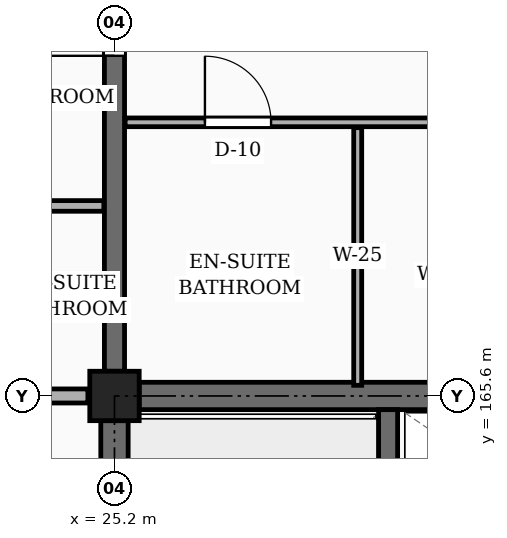
"""IFC4 building model, lengths in metres.
Left out: names, types, materials, properties, quantities, classifications, styles, units other than length and angle.
Written with IfcOpenShell. Run it as: python <this file> out.ifc"""

import sys

from ifc_helpers import new_model, si_unit, direction, frame, frame_2d, origin, origin_2d, place, context, subcontext, project, spatial, rectangle, extrude, element, fill, save


model = new_model("IFC4")
c1 = context("Model", 3, precision=1e-05, world=origin(), true_north=direction((0.0, 1.0)))
c2 = subcontext(c1, "Body", "Model", "MODEL_VIEW")
j1 = project(units=[si_unit("LENGTHUNIT", "METRE"), si_unit("PLANEANGLEUNIT", "RADIAN")], contexts=[c1])
p1 = place(None, origin())
s1 = spatial("IfcSite", under=j1, at=p1, CompositionType="ELEMENT")
p2 = place(p1, origin())
s2 = spatial("IfcBuilding", under=s1, at=p2, CompositionType="ELEMENT")
p3 = place(p2, origin())
s3 = spatial("IfcBuildingStorey", under=s2, at=p3, CompositionType="ELEMENT", Elevation=0.0)
p4 = place(p3, frame((25.2, 165.6, 0.0), z_axis=(0.0, 0.0, 1.0), x_axis=(1.0, 0.0, 0.0)))
e1 = element("IfcColumn", 1, at=p4, inside=s3, PredefinedType="COLUMN", context=c2, shape_type="SweptSolid", body=[
    extrude(rectangle(XDim=0.65, YDim=0.65, at=origin_2d()), origin(), (0.0, 0.0, 1.0), 4.5),
])
p5 = place(p3, frame((25.2, 165.925, 0.0), z_axis=(0.0, 0.0, 1.0), x_axis=(0.0, 1.0, 0.0)))
e2 = element("IfcWall", 2, at=p5, inside=s3, PredefinedType="SOLIDWALL", context=c2, shape_type="SweptSolid", body=[
    extrude(rectangle(XDim=6.615, YDim=0.265, at=frame_2d((3.308, 0.0))), origin(), (0.0, 0.0, 1.0), 3.535),
])
p6 = place(p5, frame((4.15, 0.0, 0.0)))
e3 = element("IfcOpeningElement", 3, at=p6, cuts=e2, PredefinedType="OPENING", context=c2, shape_type="SweptSolid", body=[
    extrude(rectangle(XDim=0.98, YDim=2.12, at=frame_2d((0.49, 1.06))), frame((0.0, 0.143, 0.0), z_axis=(0.0, -1.0, 0.0), x_axis=(1.0, 0.0, 0.0)), (0.0, 0.0, 1.0), 0.285),
])
p7 = place(p3, frame((25.2, 158.725, 0.0), z_axis=(0.0, 0.0, 1.0), x_axis=(0.0, 1.0, 0.0)))
e4 = element("IfcWall", 4, at=p7, inside=s3, PredefinedType="SHEAR", context=c2, shape_type="SweptSolid", body=[
    extrude(rectangle(XDim=6.55, YDim=0.36, at=frame_2d((3.275, 0.0))), origin(), (0.0, 0.0, 1.0), 4.235),
])
p8 = place(p3, frame((25.525, 165.6, 0.0), z_axis=(0.0, 0.0, 1.0), x_axis=(1.0, 0.0, 0.0)))
e5 = element("IfcWall", 5, at=p8, inside=s3, PredefinedType="SHEAR", context=c2, shape_type="SweptSolid", body=[
    extrude(rectangle(XDim=6.55, YDim=0.36, at=frame_2d((3.275, 0.0))), origin(), (0.0, 0.0, 1.0), 4.235),
])
p9 = place(p3, frame((28.8, 158.58, 0.0), z_axis=(0.0, 0.0, 1.0), x_axis=(0.0, 1.0, 0.0)))
e6 = element("IfcWall", 6, at=p9, inside=s3, PredefinedType="SHEAR", context=c2, shape_type="SweptSolid", body=[
    extrude(rectangle(XDim=6.84, YDim=0.25, at=frame_2d((3.42, 0.0))), origin(), (0.0, 0.0, 1.0), 4.235),
])
p10 = place(p9, frame((0.42, 0.0, 0.0)))
e7 = element("IfcOpeningElement", 7, at=p10, cuts=e6, PredefinedType="OPENING", context=c2, shape_type="SweptSolid", body=[
    extrude(rectangle(XDim=1.05, YDim=2.15, at=frame_2d((0.525, 1.075))), frame((0.0, 0.135, 0.0), z_axis=(0.0, -1.0, 0.0), x_axis=(1.0, 0.0, 0.0)), (0.0, 0.0, 1.0), 0.27),
])
p11 = place(p3, frame((18.35, 165.6, 0.0), z_axis=(0.0, 0.0, 1.0), x_axis=(1.0, 0.0, 0.0)))
e8 = element("IfcWall", 8, at=p11, inside=s3, PredefinedType="PARTITIONING", context=c2, shape_type="SweptSolid", body=[
    extrude(rectangle(XDim=6.5, YDim=0.185, at=frame_2d((3.25, 0.0))), origin(), (0.0, 0.0, 1.0), 3.435),
])
p12 = place(p11, frame((1.0, 0.0, 0.0)))
e9 = element("IfcOpeningElement", 9, at=p12, cuts=e8, PredefinedType="OPENING", context=c2, shape_type="SweptSolid", body=[
    extrude(rectangle(XDim=1.14, YDim=2.18, at=frame_2d((0.57, 1.09))), frame((0.0, 0.103, 0.0), z_axis=(0.0, -1.0, 0.0), x_axis=(1.0, 0.0, 0.0)), (0.0, 0.0, 1.0), 0.205),
])
p13 = place(p3, frame((18.14, 168.1, 0.0), z_axis=(0.0, 0.0, 1.0), x_axis=(1.0, 0.0, 0.0)))
e10 = element("IfcWall", 10, at=p13, inside=s3, PredefinedType="PARTITIONING", context=c2, shape_type="SweptSolid", body=[
    extrude(rectangle(XDim=6.92, YDim=0.14, at=frame_2d((3.46, 0.0))), origin(), (0.0, 0.0, 1.0), 3.67),
])
p14 = place(p13, frame((1.31, 0.0, 0.0)))
e11 = element("IfcOpeningElement", 11, at=p14, cuts=e10, PredefinedType="OPENING", context=c2, shape_type="SweptSolid", body=[
    extrude(rectangle(XDim=0.95, YDim=2.1, at=frame_2d((0.475, 1.05))), frame((0.0, 0.08, 0.0), z_axis=(0.0, -1.0, 0.0), x_axis=(1.0, 0.0, 0.0)), (0.0, 0.0, 1.0), 0.16),
])
p15 = place(p3, frame((25.34, 169.2, 0.0), z_axis=(0.0, 0.0, 1.0), x_axis=(1.0, 0.0, 0.0)))
e12 = element("IfcWall", 12, at=p15, inside=s3, PredefinedType="PARTITIONING", context=c2, shape_type="SweptSolid", body=[
    extrude(rectangle(XDim=6.92, YDim=0.115, at=frame_2d((3.46, 0.0))), origin(), (0.0, 0.0, 1.0), 3.67),
])
p16 = place(p15, frame((1.05, 0.0, 0.0)))
e13 = element("IfcOpeningElement", 13, at=p16, cuts=e12, PredefinedType="OPENING", context=c2, shape_type="SweptSolid", body=[
    extrude(rectangle(XDim=0.87, YDim=2.05, at=frame_2d((0.435, 1.025))), frame((0.0, 0.067, 0.0), z_axis=(0.0, -1.0, 0.0), x_axis=(1.0, 0.0, 0.0)), (0.0, 0.0, 1.0), 0.135),
])
p17 = place(p15, frame((4.45, 0.0, 0.0)))
e14 = element("IfcOpeningElement", 14, at=p17, cuts=e12, PredefinedType="OPENING", context=c2, shape_type="SweptSolid", body=[
    extrude(rectangle(XDim=0.88, YDim=2.08, at=frame_2d((0.44, 1.04))), frame((0.0, 0.067, 0.0), z_axis=(0.0, -1.0, 0.0), x_axis=(1.0, 0.0, 0.0)), (0.0, 0.0, 1.0), 0.135),
])
p18 = place(p3, frame((28.4, 165.74, 0.0), z_axis=(0.0, 0.0, 1.0), x_axis=(0.0, 1.0, 0.0)))
e15 = element("IfcWall", 15, at=p18, inside=s3, PredefinedType="PARTITIONING", context=c2, shape_type="SweptSolid", body=[
    extrude(rectangle(XDim=3.39, YDim=0.105, at=frame_2d((1.695, 0.0))), origin(), (0.0, 0.0, 1.0), 3.67),
])
p19 = place(p16, origin())
e16 = element("IfcDoor", 16, at=p19, inside=s3, OperationType="SINGLE_SWING_LEFT", PredefinedType="DOOR", context=c2, shape_type="SweptSolid", body=[
    extrude(rectangle(XDim=0.87, YDim=2.05, at=frame_2d((0.435, 1.025))), frame((0.0, 0.025, 0.0), z_axis=(0.0, -1.0, 0.0), x_axis=(1.0, 0.0, 0.0)), (0.0, 0.0, 1.0), 0.05),
])
fill(e13, e16)
p20 = place(p6, origin())
e17 = element("IfcDoor", 17, at=p20, inside=s3, OperationType="SINGLE_SWING_LEFT", PredefinedType="DOOR", context=c2, shape_type="SweptSolid", body=[
    extrude(rectangle(XDim=0.98, YDim=2.12, at=frame_2d((0.49, 1.06))), frame((0.0, 0.025, 0.0), z_axis=(0.0, -1.0, 0.0), x_axis=(1.0, 0.0, 0.0)), (0.0, 0.0, 1.0), 0.05),
])
fill(e3, e17)
save(model, sys.argv[1])
